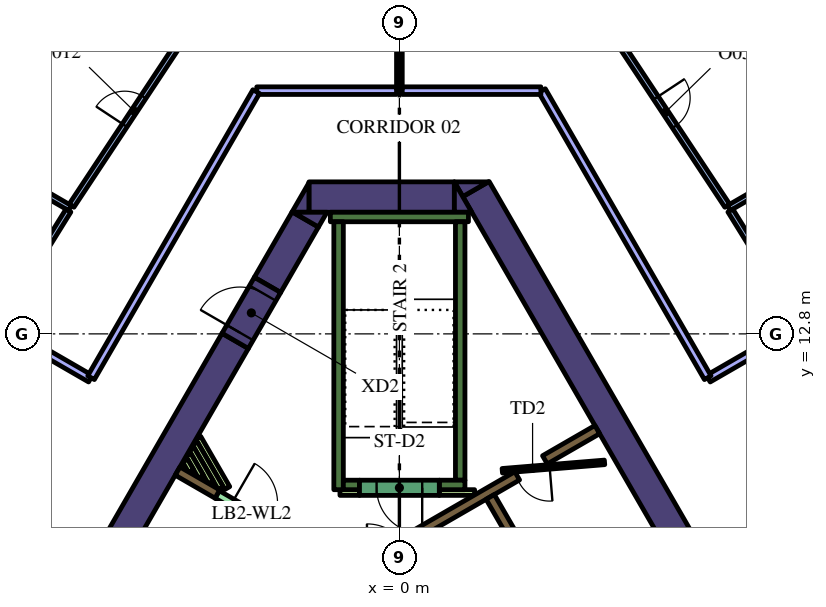
"""IFC4 building model, lengths in metres.
Left out: names, types, materials, properties, quantities, classifications, styles, units other than length and angle.
Written with IfcOpenShell. Run it as: python <this file> out.ifc"""

import sys

from ifc_helpers import new_model, si_unit, direction, frame, frame_2d, origin, place, context, subcontext, project, spatial, polyline, rectangle, outline, extrude, element, fill, save


model = new_model("IFC4")
c1 = context("Model", 3, precision=1e-05, world=origin(), true_north=direction((0.0, 1.0)))
c2 = subcontext(c1, "Body", "Model", "MODEL_VIEW")
j1 = project(units=[si_unit("LENGTHUNIT", "METRE"), si_unit("PLANEANGLEUNIT", "RADIAN")], contexts=[c1])
p1 = place(None, origin())
s1 = spatial("IfcSite", under=j1, at=p1, CompositionType="ELEMENT")
p2 = place(p1, origin())
s2 = spatial("IfcBuilding", under=s1, at=p2, CompositionType="ELEMENT")
p3 = place(p2, frame((0.0, 0.0, 192.0)))
s3 = spatial("IfcBuildingStorey", under=s2, at=p3, CompositionType="ELEMENT", Elevation=192.0)
p4 = place(p3, frame((8.279, 5.761, 0.0), z_axis=(0.0, 0.0, 1.0), x_axis=(-0.500010359015, 0.866019422922, 0.0)))
e1 = element("IfcWall", 1, at=p4, inside=s3, PredefinedType="SOLIDWALL", context=c2, shape_type="SweptSolid", body=[
    extrude(rectangle(XDim=12.528, YDim=0.8, at=frame_2d((6.264, 0.0))), origin(), (0.0, 0.0, 1.0), 4.2),
])
p5 = place(p3, origin())
e2 = element("IfcWall", 2, at=p5, inside=s3, PredefinedType="SOLIDWALL", context=c2, shape_type="SweptSolid", body=[
    extrude(outline(polyline([(1.443, 16.8), (2.339, 16.8), (1.667, 16.412), (1.443, 16.8)])), origin(), (0.0, 0.0, 1.0), 4.2),
])
p6 = place(p3, frame((-2.379, 16.4, 0.0), z_axis=(0.0, 0.0, 1.0), x_axis=(1.0, 0.0, 0.0)))
e3 = element("IfcWall", 3, at=p6, inside=s3, PredefinedType="SOLIDWALL", context=c2, shape_type="SweptSolid", body=[
    extrude(rectangle(XDim=3.824, YDim=0.8, at=frame_2d((1.912, 0.0))), origin(), (0.0, 0.0, 1.0), 4.2),
])
e4 = element("IfcWall", 4, at=p5, inside=s3, PredefinedType="SOLIDWALL", context=c2, shape_type="SweptSolid", body=[
    extrude(outline(polyline([(1.905, 16.0), (1.447, 16.0), (1.447, 16.793), (1.905, 16.0)])), origin(), (0.0, 0.0, 1.0), 4.2),
])
e5 = element("IfcWall", 5, at=p5, inside=s3, PredefinedType="SOLIDWALL", context=c2, shape_type="SweptSolid", body=[
    extrude(outline(polyline([(-2.829, 16.0), (-2.381, 16.776), (-2.381, 16.0), (-2.829, 16.0)])), origin(), (0.0, 0.0, 1.0), 4.2),
])
p7 = place(p3, frame((-2.477, 15.81, 0.0), z_axis=(0.0, 0.0, 1.0), x_axis=(-0.499903161488, -0.866081306307, 0.0)))
e6 = element("IfcWall", 6, at=p7, inside=s3, PredefinedType="SOLIDWALL", context=c2, shape_type="SweptSolid", body=[
    extrude(rectangle(XDim=1.988, YDim=0.8, at=frame_2d((0.994, 0.0))), origin(), (0.0, 0.0, 1.0), 4.2),
])
e7 = element("IfcWall", 7, at=p5, inside=s3, PredefinedType="SOLIDWALL", context=c2, shape_type="SweptSolid", body=[
    extrude(outline(polyline([(-1.905, 16.0), (-2.129, 15.612), (-2.801, 16.0), (-1.905, 16.0)])), origin(), (0.0, 0.0, 1.0), 4.2),
])
p8 = place(p3, frame((-4.321, 12.616, 0.0), z_axis=(0.0, 0.0, 1.0), x_axis=(-0.500009809857, -0.866019739987, 0.0)))
e8 = element("IfcWall", 8, at=p8, inside=s3, PredefinedType="SOLIDWALL", context=c2, shape_type="SweptSolid", body=[
    extrude(rectangle(XDim=16.695, YDim=0.8, at=frame_2d((8.347, 0.0))), origin(), (0.0, 0.0, 1.0), 4.2),
])
p9 = place(p3, frame((-1.817, 15.875, 0.0), z_axis=(0.0, 0.0, 1.0), x_axis=(1.0, 0.0, 0.0)))
e9 = element("IfcWall", 9, at=p9, inside=s3, PredefinedType="SOLIDWALL", context=c2, shape_type="SweptSolid", body=[
    extrude(rectangle(XDim=3.634, YDim=0.25, at=frame_2d((1.817, 0.0))), origin(), (0.0, 0.0, 1.0), 4.2),
])
p10 = place(p3, frame((1.6, 8.95, 0.0), z_axis=(0.0, 0.0, 1.0), x_axis=(0.0, 1.0, 0.0)))
e10 = element("IfcWall", 10, at=p10, inside=s3, PredefinedType="SOLIDWALL", context=c2, shape_type="SweptSolid", body=[
    extrude(rectangle(XDim=6.8, YDim=0.25, at=frame_2d((3.4, 0.0))), origin(), (0.0, 0.0, 1.0), 4.2),
])
p11 = place(p3, frame((1.05, 8.825, 0.0), z_axis=(0.0, 0.0, 1.0), x_axis=(1.0, 0.0, 0.0)))
e11 = element("IfcWall", 11, at=p11, inside=s3, PredefinedType="SOLIDWALL", context=c2, shape_type="SweptSolid", body=[
    extrude(rectangle(XDim=0.675, YDim=0.25, at=frame_2d((0.337, 0.0))), origin(), (0.0, 0.0, 1.0), 4.2),
])
p12 = place(p3, frame((-1.6, 8.7, 0.0), z_axis=(0.0, 0.0, 1.0), x_axis=(0.0, 1.0, 0.0)))
e12 = element("IfcWall", 12, at=p12, inside=s3, PredefinedType="SOLIDWALL", context=c2, shape_type="SweptSolid", body=[
    extrude(rectangle(XDim=7.05, YDim=0.25, at=frame_2d((3.525, 0.0))), origin(), (0.0, 0.0, 1.0), 4.2),
])
p13 = place(p3, frame((-1.475, 8.825, 0.0), z_axis=(0.0, 0.0, 1.0), x_axis=(1.0, 0.0, 0.0)))
e13 = element("IfcWall", 13, at=p13, inside=s3, PredefinedType="SOLIDWALL", context=c2, shape_type="SweptSolid", body=[
    extrude(rectangle(XDim=0.425, YDim=0.25, at=frame_2d((0.212, 0.0))), origin(), (0.0, 0.0, 1.0), 4.2),
])
p14 = place(p3, frame((3.1, 9.064, 0.0), z_axis=(0.0, 0.0, 1.0), x_axis=(-0.866033137035, -0.499986605379, 0.0)))
e14 = element("IfcWall", 14, at=p14, inside=s3, PredefinedType="SOLIDWALL", context=c2, shape_type="SweptSolid", body=[
    extrude(rectangle(XDim=3.467, YDim=0.25, at=frame_2d((1.733, 0.0))), origin(), (0.0, 0.0, 1.0), 4.2),
])
p15 = place(p3, frame((3.83, 9.486, 0.0), z_axis=(0.0, 0.0, 1.0), x_axis=(0.865986202621, 0.500067892261, 0.0)))
e15 = element("IfcWall", 15, at=p15, inside=s3, PredefinedType="SOLIDWALL", context=c2, shape_type="SweptSolid", body=[
    extrude(rectangle(XDim=1.591, YDim=0.25, at=frame_2d((0.795, 0.0))), origin(), (0.0, 0.0, 1.0), 4.2),
])
p16 = place(p3, frame((-5.837, 9.19, 0.0), z_axis=(0.0, 0.0, 1.0), x_axis=(0.866024298998, -0.500001913541, 0.0)))
e16 = element("IfcWall", 16, at=p16, inside=s3, PredefinedType="SOLIDWALL", context=c2, shape_type="SweptSolid", body=[
    extrude(rectangle(XDim=1.21, YDim=0.25, at=frame_2d((0.605, 0.0))), origin(), (0.0, 0.0, 1.0), 4.2),
])
p17 = place(p3, frame((-5.294, 10.067, 0.0), z_axis=(0.0, 0.0, 1.0), x_axis=(0.500054140411, -0.865994143547, 0.0)))
e17 = element("IfcWall", 17, at=p17, inside=s3, PredefinedType="PARTITIONING", context=c2, shape_type="SweptSolid", body=[
    extrude(rectangle(XDim=1.529, YDim=0.15, at=frame_2d((0.765, 0.0))), origin(), (0.0, 0.0, 1.0), 3.1),
])
p18 = place(p3, frame((-5.381, 9.917, 0.0), z_axis=(0.0, 0.0, 1.0), x_axis=(0.500136970483, -0.865946309396, 0.0)))
e18 = element("IfcWall", 18, at=p18, inside=s3, PredefinedType="PARTITIONING", context=c2, shape_type="SweptSolid", body=[
    extrude(rectangle(XDim=1.359, YDim=0.15, at=frame_2d((0.68, 0.0))), origin(), (0.0, 0.0, 1.0), 3.1),
])
p19 = place(p3, frame((-5.467, 9.767, 0.0), z_axis=(0.0, 0.0, 1.0), x_axis=(0.500168849293, -0.86592789665, 0.0)))
e19 = element("IfcWall", 19, at=p19, inside=s3, PredefinedType="PARTITIONING", context=c2, shape_type="SweptSolid", body=[
    extrude(rectangle(XDim=1.01, YDim=0.15, at=frame_2d((0.505, 0.0))), origin(), (0.0, 0.0, 1.0), 3.1),
])
p20 = place(p3, frame((-5.554, 9.617, 0.0), z_axis=(0.0, 0.0, 1.0), x_axis=(0.500253084543, -0.86587923604, 0.0)))
e20 = element("IfcWall", 20, at=p20, inside=s3, PredefinedType="PARTITIONING", context=c2, shape_type="SweptSolid", body=[
    extrude(rectangle(XDim=0.664, YDim=0.15, at=frame_2d((0.332, 0.0))), origin(), (0.0, 0.0, 1.0), 3.1),
])
p21 = place(p3, frame((-5.64, 9.467, 0.0), z_axis=(0.0, 0.0, 1.0), x_axis=(0.499944387978, -0.86605750902, 0.0)))
e21 = element("IfcWall", 21, at=p21, inside=s3, PredefinedType="PARTITIONING", context=c2, shape_type="SweptSolid", body=[
    extrude(rectangle(XDim=0.317, YDim=0.15, at=frame_2d((0.159, 0.0))), origin(), (0.0, 0.0, 1.0), 3.1),
])
p22 = place(p3, frame((1.05, 8.625, 0.0), z_axis=(0.0, 0.0, 1.0), x_axis=(1.0, 0.0, 0.0)))
e22 = element("IfcWall", 22, at=p22, inside=s3, PredefinedType="PARTITIONING", context=c2, shape_type="SweptSolid", body=[
    extrude(rectangle(XDim=0.929, YDim=0.15, at=frame_2d((0.464, 0.0))), origin(), (0.0, 0.0, 1.0), 3.1),
])
p23 = place(p3, frame((-1.564, 8.625, 0.0), z_axis=(0.0, 0.0, 1.0), x_axis=(1.0, 0.0, 0.0)))
e23 = element("IfcWall", 23, at=p23, inside=s3, PredefinedType="PARTITIONING", context=c2, shape_type="SweptSolid", body=[
    extrude(rectangle(XDim=0.514, YDim=0.15, at=frame_2d((0.257, 0.0))), origin(), (0.0, 0.0, 1.0), 3.1),
])
p24 = place(p3, frame((8.565, -2.185, 0.0), z_axis=(0.0, 0.0, 1.0), x_axis=(-0.499997954832, 0.866026584559, 0.0)))
e24 = element("IfcWall", 24, at=p24, inside=s3, PredefinedType="SOLIDWALL", context=c2, shape_type="SweptSolid", body=[
    extrude(rectangle(XDim=12.35, YDim=0.25, at=frame_2d((6.175, 0.0))), origin(), (0.0, 0.0, 1.0), 4.2),
])
p25 = place(p24, frame((0.585, 0.0, 0.0)))
e25 = element("IfcOpeningElement", 25, at=p25, cuts=e24, PredefinedType="OPENING", context=c2, shape_type="SweptSolid", body=[
    extrude(rectangle(XDim=1.1, YDim=2.1, at=frame_2d((0.55, 1.05))), frame((0.0, 0.135, 0.0), z_axis=(0.0, -1.0, 0.0), x_axis=(1.0, 0.0, 0.0)), (0.0, 0.0, 1.0), 0.27),
])
p26 = place(p3, frame((1.05, 8.75, 0.0), z_axis=(0.0, 0.0, 1.0), x_axis=(-1.0, 0.0, 0.0)))
e26 = element("IfcWall", 26, at=p26, inside=s3, PredefinedType="SOLIDWALL", context=c2, shape_type="SweptSolid", body=[
    extrude(rectangle(XDim=2.1, YDim=0.4, at=frame_2d((1.05, 0.0))), origin(), (0.0, 0.0, 1.0), 4.2),
])
p27 = place(p26, frame((0.45, 0.0, 0.0)))
e27 = element("IfcOpeningElement", 27, at=p27, cuts=e26, PredefinedType="OPENING", context=c2, shape_type="SweptSolid", body=[
    extrude(rectangle(XDim=1.2, YDim=2.1, at=frame_2d((0.6, 1.05))), frame((0.0, 0.21, 0.0), z_axis=(0.0, -1.0, 0.0), x_axis=(1.0, 0.0, 0.0)), (0.0, 0.0, 1.0), 0.42),
])
p28 = place(p3, frame((5.398, 9.419, 0.0), z_axis=(0.0, 0.0, 1.0), x_axis=(-0.996653416376, -0.081743303248, 0.0)))
e28 = element("IfcWall", 28, at=p28, inside=s3, PredefinedType="PARTITIONING", context=c2, shape_type="SweptSolid", body=[
    extrude(rectangle(XDim=2.7, YDim=0.12, at=frame_2d((1.35, 0.0))), origin(), (0.0, 0.0, 1.0), 3.1),
])
p29 = place(p28, frame((1.45, 0.0, 0.0)))
e29 = element("IfcOpeningElement", 29, at=p29, cuts=e28, PredefinedType="OPENING", context=c2, shape_type="SweptSolid", body=[
    extrude(rectangle(XDim=0.9, YDim=2.1, at=frame_2d((0.45, 1.05))), frame((0.0, 0.07, 0.0), z_axis=(0.0, -1.0, 0.0), x_axis=(1.0, 0.0, 0.0)), (0.0, 0.0, 1.0), 0.14),
])
p30 = place(p3, frame((-4.796, 8.575, 0.0), z_axis=(0.0, 0.0, 1.0), x_axis=(0.866009402589, -0.500027713859, 0.0)))
e30 = element("IfcWall", 30, at=p30, inside=s3, PredefinedType="PARTITIONING", context=c2, shape_type="SweptSolid", body=[
    extrude(rectangle(XDim=2.1, YDim=0.226, at=frame_2d((1.05, 0.0))), origin(), (0.0, 0.0, 1.0), 3.1),
])
p31 = place(p30, frame((0.45, 0.0, 0.0)))
e31 = element("IfcOpeningElement", 31, at=p31, cuts=e30, PredefinedType="OPENING", context=c2, shape_type="SweptSolid", body=[
    extrude(rectangle(XDim=1.2, YDim=2.1, at=frame_2d((0.6, 1.05))), frame((0.0, 0.123, 0.0), z_axis=(0.0, -1.0, 0.0), x_axis=(1.0, 0.0, 0.0)), (0.0, 0.0, 1.0), 0.246),
])
p32 = place(p3, frame((-4.321, 12.616, 0.0), z_axis=(0.0, 0.0, 1.0), x_axis=(0.499892348375, 0.866087547558, 0.0)))
e32 = element("IfcWall", 32, at=p32, inside=s3, PredefinedType="SOLIDWALL", context=c2, shape_type="SweptSolid", body=[
    extrude(rectangle(XDim=1.7, YDim=0.8, at=frame_2d((0.85, 0.0))), origin(), (0.0, 0.0, 1.0), 4.2),
])
p33 = place(p32, frame((0.25, 0.0, 0.0)))
e33 = element("IfcOpeningElement", 33, at=p33, cuts=e32, PredefinedType="OPENING", context=c2, shape_type="SweptSolid", body=[
    extrude(rectangle(XDim=1.2, YDim=2.1, at=frame_2d((0.6, 1.05))), frame((0.0, 0.41, 0.0), z_axis=(0.0, -1.0, 0.0), x_axis=(1.0, 0.0, 0.0)), (0.0, 0.0, 1.0), 0.82),
])
p34 = place(p3, frame((8.669, 16.11, 0.0), z_axis=(0.0, 0.0, 1.0), x_axis=(0.866019272134, 0.50001062018, 0.0)))
e34 = element("IfcWall", 34, at=p34, inside=s3, PredefinedType="PARTITIONING", context=c2, shape_type="SweptSolid", body=[
    extrude(rectangle(XDim=4.449, YDim=0.15, at=frame_2d((2.225, 0.0))), origin(), (0.0, 0.0, 1.0), 3.1),
])
p35 = place(p3, frame((8.708, 16.046, 0.0), z_axis=(0.0, 0.0, 1.0), x_axis=(0.527179193015, -0.849754140003, 0.0)))
e35 = element("IfcWall", 35, at=p35, inside=s3, PredefinedType="PARTITIONING", context=c2, shape_type="SweptSolid", body=[
    extrude(rectangle(XDim=6.42, YDim=0.15, at=frame_2d((3.21, 0.0))), origin(), (0.0, 0.0, 1.0), 3.1),
])
p36 = place(p35, frame((2.719, 0.0, 0.0)))
e36 = element("IfcOpeningElement", 36, at=p36, cuts=e35, PredefinedType="OPENING", context=c2, shape_type="SweptSolid", body=[
    extrude(rectangle(XDim=0.9, YDim=2.1, at=frame_2d((0.45, 1.05))), frame((0.0, 0.085, 0.0), z_axis=(0.0, -1.0, 0.0), x_axis=(1.0, 0.0, 0.0)), (0.0, 0.0, 1.0), 0.17),
])
p37 = place(p3, frame((5.352, 21.121, 0.0), z_axis=(0.0, 0.0, 1.0), x_axis=(0.551896352686, -0.833912714792, 0.0)))
e37 = element("IfcWall", 37, at=p37, inside=s3, PredefinedType="PARTITIONING", context=c2, shape_type="SweptSolid", body=[
    extrude(rectangle(XDim=5.934, YDim=0.15, at=frame_2d((2.967, 0.0))), origin(), (0.0, 0.0, 1.0), 3.1),
])
p38 = place(p37, frame((2.534, 0.0, 0.0)))
e38 = element("IfcOpeningElement", 38, at=p38, cuts=e37, PredefinedType="OPENING", context=c2, shape_type="SweptSolid", body=[
    extrude(rectangle(XDim=0.9, YDim=2.1, at=frame_2d((0.45, 1.05))), frame((0.0, 0.085, 0.0), z_axis=(0.0, -1.0, 0.0), x_axis=(1.0, 0.0, 0.0)), (0.0, 0.0, 1.0), 0.17),
])
p39 = place(p3, frame((0.0, 19.2, 0.0), z_axis=(0.0, 0.0, 1.0), x_axis=(0.0, 1.0, 0.0)))
e39 = element("IfcWall", 39, at=p39, inside=s3, PredefinedType="PARTITIONING", context=c2, shape_type="SweptSolid", body=[
    extrude(rectangle(XDim=7.7, YDim=0.15, at=frame_2d((3.85, 0.0))), origin(), (0.0, 0.0, 1.0), 3.1),
])
p40 = place(p3, frame((9.488, 12.406, 0.0), z_axis=(0.0, 0.0, 1.0), x_axis=(-0.865975818674, -0.500085874098, 0.0)))
e40 = element("IfcWall", 40, at=p40, inside=s3, PredefinedType="PARTITIONING", context=c2, shape_type="SweptSolid", body=[
    extrude(rectangle(XDim=1.57, YDim=0.2, at=frame_2d((0.785, 0.0))), origin(), (0.0, 0.0, 1.0), 3.1),
])
p41 = place(p3, frame((8.113, 11.647, 0.0), z_axis=(0.0, 0.0, 1.0), x_axis=(-0.500001933108, 0.866024287701, 0.0)))
e41 = element("IfcWall", 41, at=p41, inside=s3, PredefinedType="PARTITIONING", context=c2, shape_type="SweptSolid", body=[
    extrude(rectangle(XDim=8.721, YDim=0.2, at=frame_2d((4.361, 0.0))), origin(), (0.0, 0.0, 1.0), 3.1),
])
p42 = place(p3, frame((3.723, 19.2, 0.0), z_axis=(0.0, 0.0, 1.0), x_axis=(-1.0, 0.0, 0.0)))
e42 = element("IfcWall", 42, at=p42, inside=s3, PredefinedType="PARTITIONING", context=c2, shape_type="SweptSolid", body=[
    extrude(rectangle(XDim=3.648, YDim=0.2, at=frame_2d((1.824, 0.0))), origin(), (0.0, 0.0, 1.0), 3.1),
])
p43 = place(p3, frame((-8.669, 16.11, 0.0), z_axis=(0.0, 0.0, 1.0), x_axis=(-0.866019272134, 0.50001062018, 0.0)))
e43 = element("IfcWall", 43, at=p43, inside=s3, PredefinedType="PARTITIONING", context=c2, shape_type="SweptSolid", body=[
    extrude(rectangle(XDim=4.449, YDim=0.15, at=frame_2d((2.225, 0.0))), origin(), (0.0, 0.0, 1.0), 3.1),
])
p44 = place(p3, frame((-8.627, 16.173, 0.0), z_axis=(0.0, 0.0, 1.0), x_axis=(0.551896352686, 0.833912714792, 0.0)))
e44 = element("IfcWall", 44, at=p44, inside=s3, PredefinedType="PARTITIONING", context=c2, shape_type="SweptSolid", body=[
    extrude(rectangle(XDim=5.934, YDim=0.15, at=frame_2d((2.967, 0.0))), origin(), (0.0, 0.0, 1.0), 3.1),
])
p45 = place(p44, frame((2.534, 0.0, 0.0)))
e45 = element("IfcOpeningElement", 45, at=p45, cuts=e44, PredefinedType="OPENING", context=c2, shape_type="SweptSolid", body=[
    extrude(rectangle(XDim=0.9, YDim=2.1, at=frame_2d((0.45, 1.05))), frame((0.0, 0.085, 0.0), z_axis=(0.0, -1.0, 0.0), x_axis=(1.0, 0.0, 0.0)), (0.0, 0.0, 1.0), 0.17),
])
p46 = place(p3, frame((-12.093, 10.591, 0.0), z_axis=(0.0, 0.0, 1.0), x_axis=(0.527179193015, 0.849754140003, 0.0)))
e46 = element("IfcWall", 46, at=p46, inside=s3, PredefinedType="PARTITIONING", context=c2, shape_type="SweptSolid", body=[
    extrude(rectangle(XDim=6.42, YDim=0.15, at=frame_2d((3.21, 0.0))), origin(), (0.0, 0.0, 1.0), 3.1),
])
p47 = place(p46, frame((2.719, 0.0, 0.0)))
e47 = element("IfcOpeningElement", 47, at=p47, cuts=e46, PredefinedType="OPENING", context=c2, shape_type="SweptSolid", body=[
    extrude(rectangle(XDim=0.9, YDim=2.1, at=frame_2d((0.45, 1.05))), frame((0.0, 0.085, 0.0), z_axis=(0.0, -1.0, 0.0), x_axis=(1.0, 0.0, 0.0)), (0.0, 0.0, 1.0), 0.17),
])
p48 = place(p3, frame((-8.128, 11.621, 0.0), z_axis=(0.0, 0.0, 1.0), x_axis=(-0.866028054938, 0.499995408039, 0.0)))
e48 = element("IfcWall", 48, at=p48, inside=s3, PredefinedType="PARTITIONING", context=c2, shape_type="SweptSolid", body=[
    extrude(rectangle(XDim=1.6, YDim=0.2, at=frame_2d((0.8, 0.0))), origin(), (0.0, 0.0, 1.0), 3.1),
])
p49 = place(p3, frame((-0.075, 19.2, 0.0), z_axis=(0.0, 0.0, 1.0), x_axis=(-1.0, 0.0, 0.0)))
e49 = element("IfcWall", 49, at=p49, inside=s3, PredefinedType="PARTITIONING", context=c2, shape_type="SweptSolid", body=[
    extrude(rectangle(XDim=3.678, YDim=0.2, at=frame_2d((1.839, 0.0))), origin(), (0.0, 0.0, 1.0), 3.1),
])
p50 = place(p3, frame((-3.768, 19.174, 0.0), z_axis=(0.0, 0.0, 1.0), x_axis=(-0.499985066967, -0.866034025203, 0.0)))
e50 = element("IfcWall", 50, at=p50, inside=s3, PredefinedType="PARTITIONING", context=c2, shape_type="SweptSolid", body=[
    extrude(rectangle(XDim=8.691, YDim=0.2, at=frame_2d((4.346, 0.0))), origin(), (0.0, 0.0, 1.0), 3.1),
])
p51 = place(p27, origin())
e51 = element("IfcDoor", 51, at=p51, inside=s3, OperationType="SINGLE_SWING_LEFT", PredefinedType="DOOR", context=c2, shape_type="SweptSolid", body=[
    extrude(rectangle(XDim=1.2, YDim=2.1, at=frame_2d((0.6, 1.05))), frame((0.0, 0.025, 0.0), z_axis=(0.0, -1.0, 0.0), x_axis=(1.0, 0.0, 0.0)), (0.0, 0.0, 1.0), 0.05),
])
fill(e27, e51)
p52 = place(p29, origin())
e52 = element("IfcDoor", 52, at=p52, inside=s3, OperationType="SINGLE_SWING_LEFT", PredefinedType="DOOR", context=c2, shape_type="SweptSolid", body=[
    extrude(rectangle(XDim=0.9, YDim=2.1, at=frame_2d((0.45, 1.05))), frame((0.0, 0.025, 0.0), z_axis=(0.0, -1.0, 0.0), x_axis=(1.0, 0.0, 0.0)), (0.0, 0.0, 1.0), 0.05),
])
fill(e29, e52)
p53 = place(p31, origin())
e53 = element("IfcDoor", 53, at=p53, inside=s3, OperationType="SINGLE_SWING_LEFT", PredefinedType="DOOR", context=c2, shape_type="SweptSolid", body=[
    extrude(rectangle(XDim=1.2, YDim=2.1, at=frame_2d((0.6, 1.05))), frame((0.0, 0.025, 0.0), z_axis=(0.0, -1.0, 0.0), x_axis=(1.0, 0.0, 0.0)), (0.0, 0.0, 1.0), 0.05),
])
fill(e31, e53)
p54 = place(p33, origin())
e54 = element("IfcDoor", 54, at=p54, inside=s3, OperationType="SINGLE_SWING_LEFT", PredefinedType="DOOR", context=c2, shape_type="SweptSolid", body=[
    extrude(rectangle(XDim=1.2, YDim=2.1, at=frame_2d((0.6, 1.05))), frame((0.0, 0.025, 0.0), z_axis=(0.0, -1.0, 0.0), x_axis=(1.0, 0.0, 0.0)), (0.0, 0.0, 1.0), 0.05),
])
fill(e33, e54)
p55 = place(p38, origin())
e55 = element("IfcDoor", 55, at=p55, inside=s3, OperationType="SINGLE_SWING_RIGHT", PredefinedType="DOOR", context=c2, shape_type="SweptSolid", body=[
    extrude(rectangle(XDim=0.9, YDim=2.1, at=frame_2d((0.45, 1.05))), frame((0.0, 0.025, 0.0), z_axis=(0.0, -1.0, 0.0), x_axis=(1.0, 0.0, 0.0)), (0.0, 0.0, 1.0), 0.05),
])
fill(e38, e55)
p56 = place(p45, origin())
e56 = element("IfcDoor", 56, at=p56, inside=s3, OperationType="SINGLE_SWING_RIGHT", PredefinedType="DOOR", context=c2, shape_type="SweptSolid", body=[
    extrude(rectangle(XDim=0.9, YDim=2.1, at=frame_2d((0.45, 1.05))), frame((0.0, 0.025, 0.0), z_axis=(0.0, -1.0, 0.0), x_axis=(1.0, 0.0, 0.0)), (0.0, 0.0, 1.0), 0.05),
])
fill(e45, e56)
save(model, sys.argv[1])
